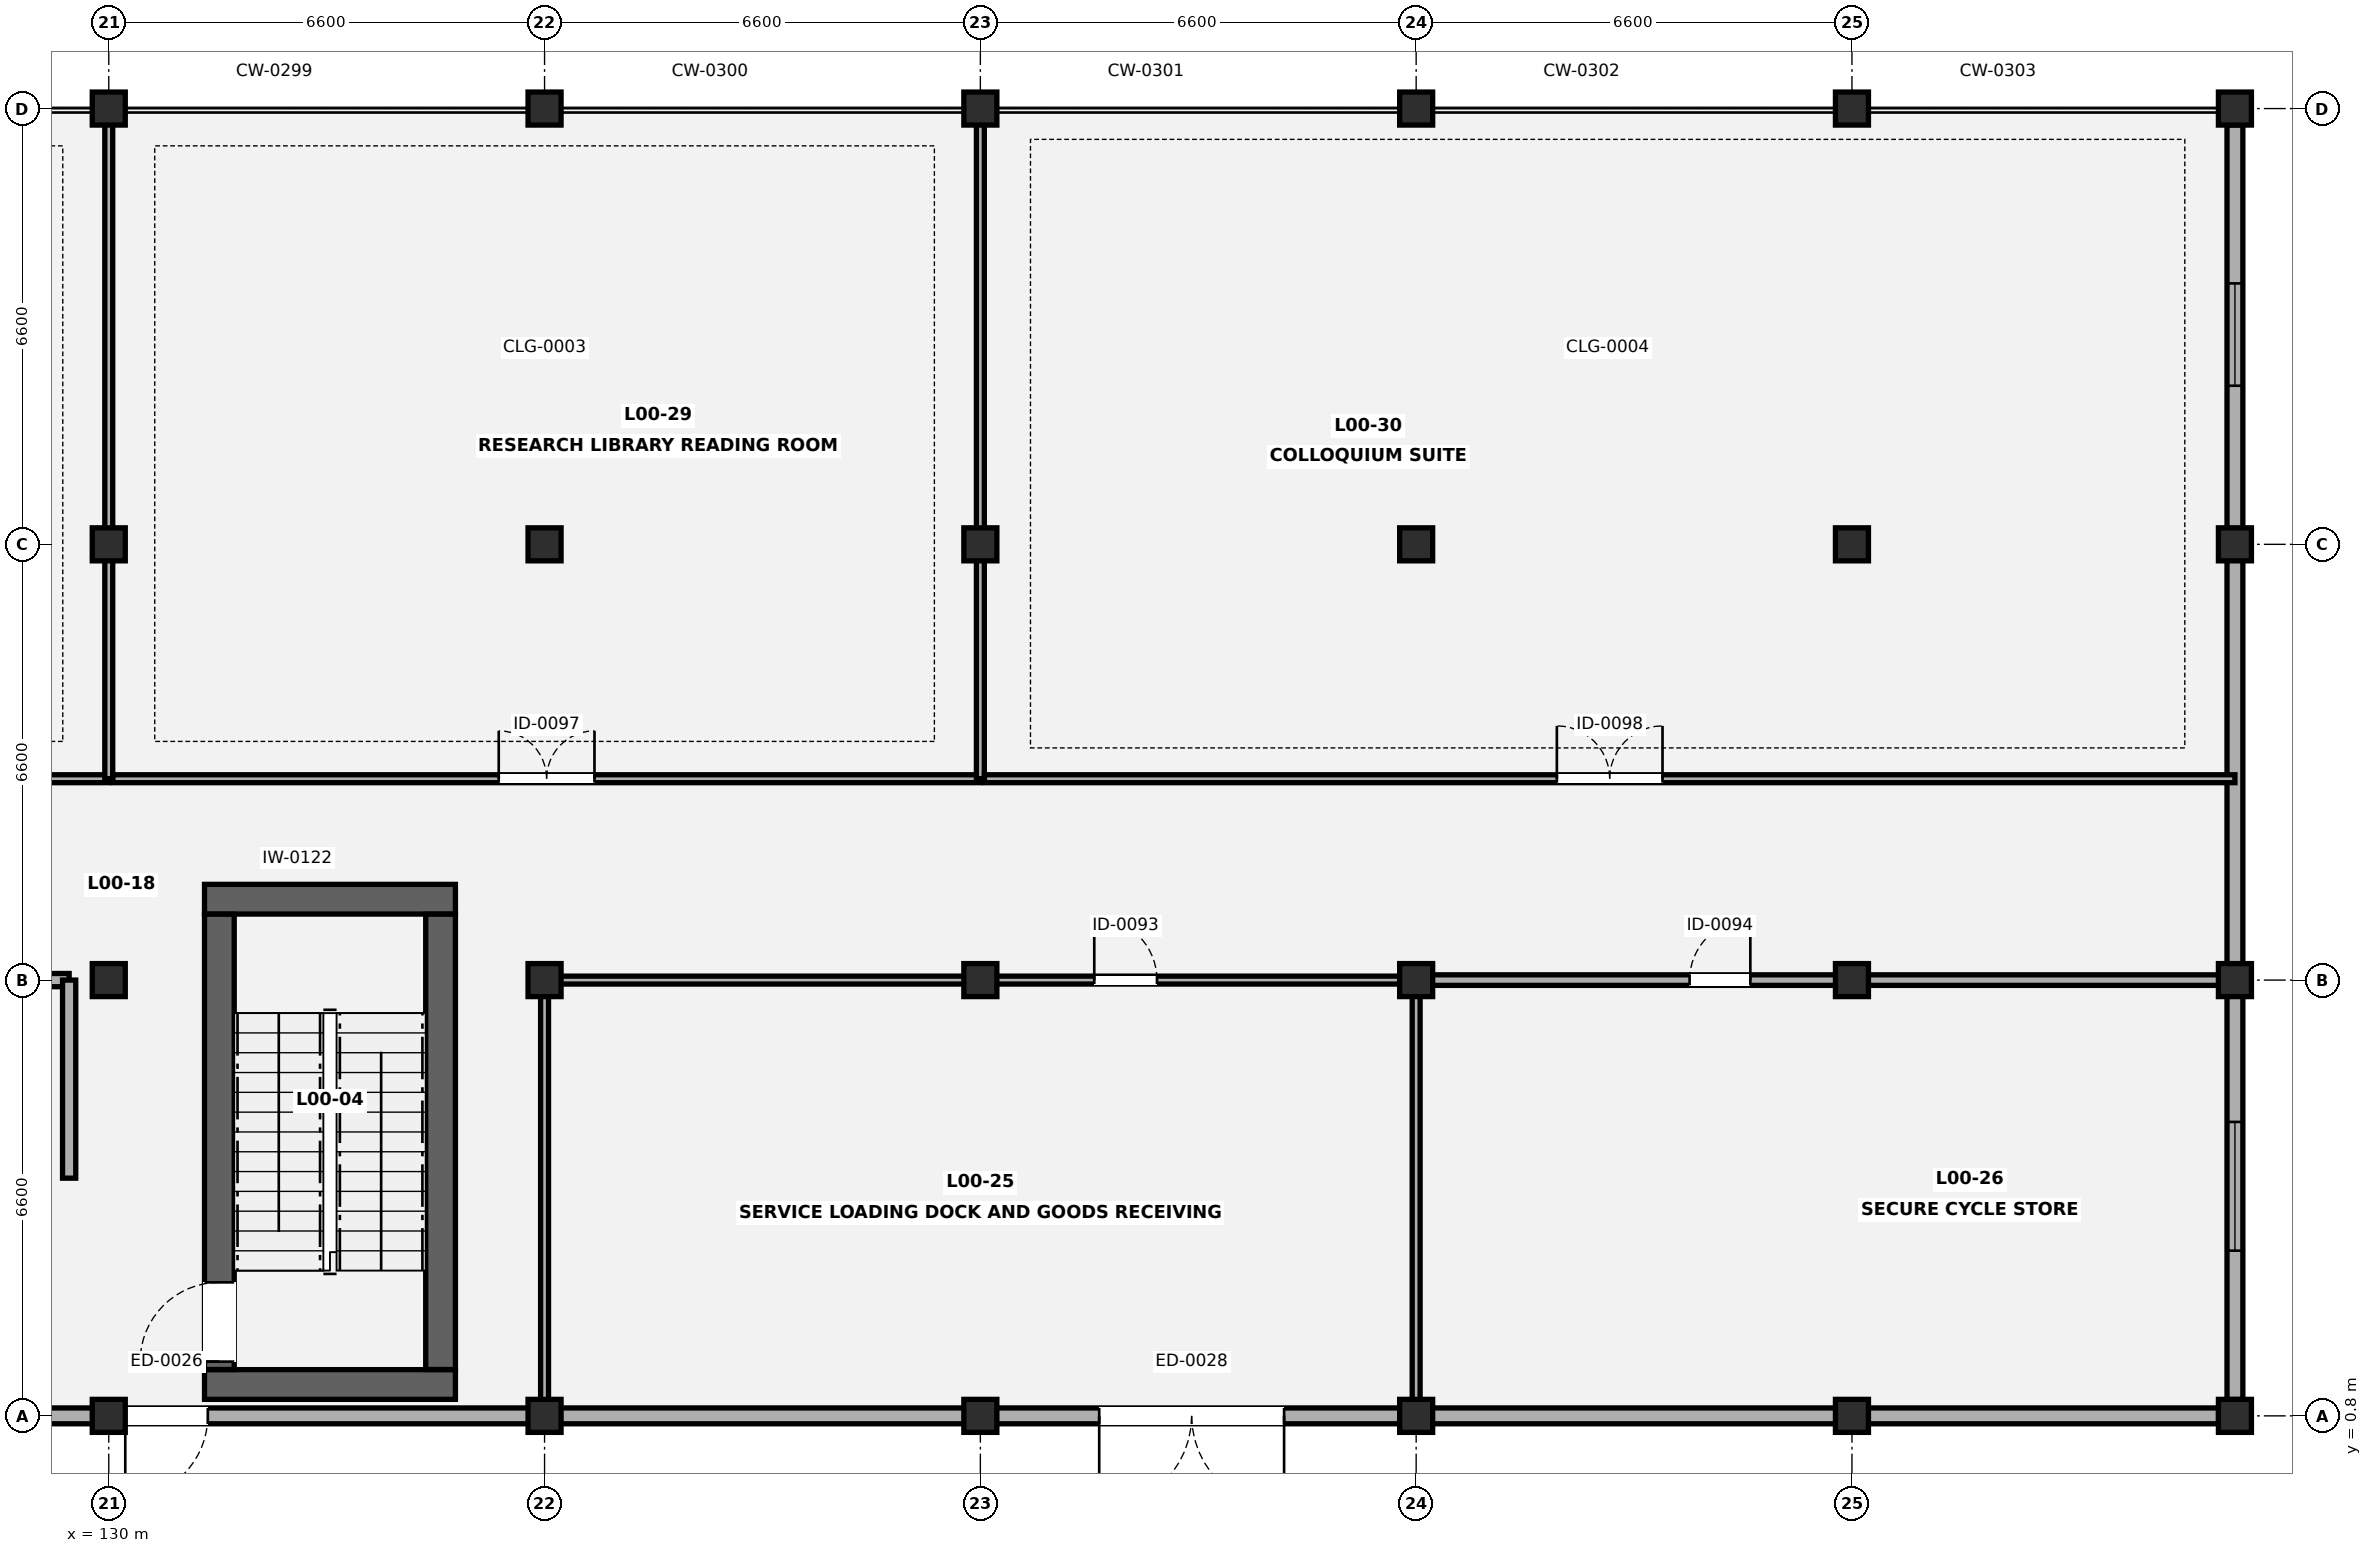
"""IFC4 building model, lengths in metres.
Left out: names, types, materials, properties, quantities, classifications, styles, units other than length and angle.
Written with IfcOpenShell. Run it as: python <this file> out.ifc"""

import sys

from ifc_helpers import new_model, si_unit, direction, frame, frame_2d, origin, origin_2d, place, context, subcontext, project, spatial, rectangle, i_section, extrude, element, fill, save


model = new_model("IFC4")
c1 = context("Model", 3, precision=1e-05, world=origin(), true_north=direction((0.0, 1.0)))
c2 = subcontext(c1, "Body", "Model", "MODEL_VIEW")
j1 = project(units=[si_unit("LENGTHUNIT", "METRE"), si_unit("PLANEANGLEUNIT", "RADIAN")], contexts=[c1])
p1 = place(None, origin())
s1 = spatial("IfcSite", under=j1, at=p1, CompositionType="ELEMENT")
p2 = place(p1, origin())
s2 = spatial("IfcBuilding", under=s1, at=p2, CompositionType="ELEMENT")
p3 = place(p2, origin())
s3 = spatial("IfcBuildingStorey", under=s2, at=p3, CompositionType="ELEMENT", Elevation=0.0)
for number, where, z_axis, x_axis in (
    (1, (130.0, 0.8, 0.0), (0.0, 0.0, 1.0), (1.0, 0.0, 0.0)),
    (2, (130.0, 7.4, 0.0), (0.0, 0.0, 1.0), (1.0, 0.0, 0.0)),
    (3, (130.0, 14.0, 0.0), (0.0, 0.0, 1.0), (1.0, 0.0, 0.0)),
    (4, (130.0, 20.6, 0.0), (0.0, 0.0, 1.0), (1.0, 0.0, 0.0)),
    (5, (136.6, 0.8, 0.0), (0.0, 0.0, 1.0), (1.0, 0.0, 0.0)),
    (6, (136.6, 7.4, 0.0), (0.0, 0.0, 1.0), (1.0, 0.0, 0.0)),
    (7, (136.6, 14.0, 0.0), (0.0, 0.0, 1.0), (1.0, 0.0, 0.0)),
    (8, (136.6, 20.6, 0.0), (0.0, 0.0, 1.0), (1.0, 0.0, 0.0)),
    (9, (143.2, 0.8, 0.0), (0.0, 0.0, 1.0), (1.0, 0.0, 0.0)),
    (10, (143.2, 7.4, 0.0), (0.0, 0.0, 1.0), (1.0, 0.0, 0.0)),
    (11, (143.2, 14.0, 0.0), (0.0, 0.0, 1.0), (1.0, 0.0, 0.0)),
    (12, (143.2, 20.6, 0.0), (0.0, 0.0, 1.0), (1.0, 0.0, 0.0)),
    (13, (149.8, 0.8, 0.0), (0.0, 0.0, 1.0), (1.0, 0.0, 0.0)),
    (14, (149.8, 7.4, 0.0), (0.0, 0.0, 1.0), (1.0, 0.0, 0.0)),
    (15, (149.8, 14.0, 0.0), (0.0, 0.0, 1.0), (1.0, 0.0, 0.0)),
    (16, (149.8, 20.6, 0.0), (0.0, 0.0, 1.0), (1.0, 0.0, 0.0)),
    (17, (156.4, 0.8, 0.0), (0.0, 0.0, 1.0), (1.0, 0.0, 0.0)),
    (18, (156.4, 7.4, 0.0), (0.0, 0.0, 1.0), (1.0, 0.0, 0.0)),
    (19, (156.4, 14.0, 0.0), (0.0, 0.0, 1.0), (1.0, 0.0, 0.0)),
    (20, (156.4, 20.6, 0.0), (0.0, 0.0, 1.0), (1.0, 0.0, 0.0)),
    (21, (162.2, 0.8, 0.0), (0.0, 0.0, 1.0), (1.0, 0.0, 0.0)),
    (22, (162.2, 7.4, 0.0), (0.0, 0.0, 1.0), (1.0, 0.0, 0.0)),
    (23, (162.2, 14.0, 0.0), (0.0, 0.0, 1.0), (1.0, 0.0, 0.0)),
    (24, (162.2, 20.6, 0.0), (0.0, 0.0, 1.0), (1.0, 0.0, 0.0)),
):
    element("IfcColumn", number, at=place(p3, frame(where, z_axis=z_axis, x_axis=x_axis)), inside=s3, PredefinedType="COLUMN", context=c2, shape_type="SweptSolid", body=[
        extrude(i_section(OverallWidth=0.5, OverallDepth=0.5, WebThickness=0.022, FlangeThickness=0.04, FilletRadius=0.016, at=origin_2d()), origin(), (0.0, 0.0, 1.0), 4.9),
    ])
p4 = place(p3, frame((162.2, 20.352, 0.0), z_axis=(0.0, 0.0, 1.0), x_axis=(0.0, -1.0, 0.0)))
e25 = element("IfcWall", 25, at=p4, inside=s3, PredefinedType="SOLIDWALL", context=c2, shape_type="SweptSolid", body=[
    extrude(rectangle(XDim=19.304, YDim=0.24, at=frame_2d((9.652, 0.0))), origin(), (0.0, 0.0, 1.0), 4.072),
])
p5 = place(p4, frame((2.4, 0.0, 0.85)))
e26 = element("IfcOpeningElement", 26, at=p5, cuts=e25, PredefinedType="OPENING", context=c2, shape_type="SweptSolid", body=[
    extrude(rectangle(XDim=1.55, YDim=1.4, at=frame_2d((0.775, 0.7))), frame((0.0, 0.13, 0.0), z_axis=(0.0, -1.0, 0.0), x_axis=(1.0, 0.0, 0.0)), (0.0, 0.0, 1.0), 0.26),
])
p6 = place(p4, frame((15.1, 0.0, 0.85)))
e27 = element("IfcOpeningElement", 27, at=p6, cuts=e25, PredefinedType="OPENING", context=c2, shape_type="SweptSolid", body=[
    extrude(rectangle(XDim=1.95, YDim=1.5, at=frame_2d((0.975, 0.75))), frame((0.0, 0.13, 0.0), z_axis=(0.0, -1.0, 0.0), x_axis=(1.0, 0.0, 0.0)), (0.0, 0.0, 1.0), 0.26),
])
p7 = place(p3, frame((161.952, 0.8, 0.0), z_axis=(0.0, 0.0, 1.0), x_axis=(-1.0, 0.0, 0.0)))
e28 = element("IfcWall", 28, at=p7, inside=s3, PredefinedType="SOLIDWALL", context=c2, shape_type="SweptSolid", body=[
    extrude(rectangle(XDim=58.104, YDim=0.24, at=frame_2d((29.052, 0.0))), origin(), (0.0, 0.0, 1.0), 4.205),
])
p8 = place(p7, frame((52.252, 0.0, 0.0)))
e29 = element("IfcOpeningElement", 29, at=p8, cuts=e28, PredefinedType="OPENING", context=c2, shape_type="SweptSolid", body=[
    extrude(rectangle(XDim=1.25, YDim=2.15, at=frame_2d((0.625, 1.075))), frame((0.0, 0.13, 0.0), z_axis=(0.0, -1.0, 0.0), x_axis=(1.0, 0.0, 0.0)), (0.0, 0.0, 1.0), 0.26),
])
p9 = place(p7, frame((30.452, 0.0, 0.0)))
e30 = element("IfcOpeningElement", 30, at=p9, cuts=e28, PredefinedType="OPENING", context=c2, shape_type="SweptSolid", body=[
    extrude(rectangle(XDim=1.25, YDim=2.15, at=frame_2d((0.625, 1.075))), frame((0.0, 0.13, 0.0), z_axis=(0.0, -1.0, 0.0), x_axis=(1.0, 0.0, 0.0)), (0.0, 0.0, 1.0), 0.26),
])
p10 = place(p7, frame((39.802, 0.0, 0.0)))
e31 = element("IfcOpeningElement", 31, at=p10, cuts=e28, PredefinedType="OPENING", context=c2, shape_type="SweptSolid", body=[
    extrude(rectangle(XDim=1.0, YDim=2.1, at=frame_2d((0.5, 1.05))), frame((0.0, 0.13, 0.0), z_axis=(0.0, -1.0, 0.0), x_axis=(1.0, 0.0, 0.0)), (0.0, 0.0, 1.0), 0.26),
])
p11 = place(p7, frame((14.152, 0.0, 0.0)))
e32 = element("IfcOpeningElement", 32, at=p11, cuts=e28, PredefinedType="OPENING", context=c2, shape_type="SweptSolid", body=[
    extrude(rectangle(XDim=2.8, YDim=2.25, at=frame_2d((1.4, 1.125))), frame((0.0, 0.13, 0.0), z_axis=(0.0, -1.0, 0.0), x_axis=(1.0, 0.0, 0.0)), (0.0, 0.0, 1.0), 0.26),
])
for number, where, z_axis, x_axis in (
    (33, (131.45, 1.275, 0.0), (0.0, 0.0, 1.0), (1.0, 0.0, 0.0)),
    (34, (131.45, 8.625, 0.0), (0.0, 0.0, 1.0), (1.0, 0.0, 0.0)),
):
    element("IfcWall", number, at=place(p3, frame(where, z_axis=z_axis, x_axis=x_axis)), inside=s3, PredefinedType="SHEAR", context=c2, shape_type="SweptSolid", body=[
        extrude(rectangle(XDim=3.8, YDim=0.45, at=frame_2d((1.9, 0.0))), origin(), (0.0, 0.0, 1.0), 4.72),
    ])
p12 = place(p3, frame((131.675, 1.502, 0.0), z_axis=(0.0, 0.0, 1.0), x_axis=(0.0, 1.0, 0.0)))
e35 = element("IfcWall", 35, at=p12, inside=s3, PredefinedType="SHEAR", context=c2, shape_type="SweptSolid", body=[
    extrude(rectangle(XDim=6.896, YDim=0.45, at=frame_2d((3.448, 0.0))), origin(), (0.0, 0.0, 1.0), 4.72),
])
p13 = place(p12, frame((0.12, 0.0, 0.0)))
e36 = element("IfcOpeningElement", 36, at=p13, cuts=e35, PredefinedType="OPENING", context=c2, shape_type="SweptSolid", body=[
    extrude(rectangle(XDim=1.2, YDim=2.15, at=frame_2d((0.6, 1.075))), frame((0.0, 0.235, 0.0), z_axis=(0.0, -1.0, 0.0), x_axis=(1.0, 0.0, 0.0)), (0.0, 0.0, 1.0), 0.47),
])
p14 = place(p3, frame((135.025, 1.502, 0.0), z_axis=(0.0, 0.0, 1.0), x_axis=(0.0, 1.0, 0.0)))
e37 = element("IfcWall", 37, at=p14, inside=s3, PredefinedType="SHEAR", context=c2, shape_type="SweptSolid", body=[
    extrude(rectangle(XDim=6.896, YDim=0.45, at=frame_2d((3.448, 0.0))), origin(), (0.0, 0.0, 1.0), 4.72),
])
p15 = place(p3, frame((125.8, 7.4, 0.0), z_axis=(0.0, 0.0, 1.0), x_axis=(1.0, 0.0, 0.0)))
e38 = element("IfcWall", 38, at=p15, inside=s3, PredefinedType="SOLIDWALL", context=c2, shape_type="SweptSolid", body=[
    extrude(rectangle(XDim=3.6, YDim=0.2, at=frame_2d((1.8, 0.0))), origin(), (0.0, 0.0, 1.0), 3.993),
])
p16 = place(p15, frame((1.225, 0.0, 0.0)))
e39 = element("IfcOpeningElement", 39, at=p16, cuts=e38, PredefinedType="OPENING", context=c2, shape_type="SweptSolid", body=[
    extrude(rectangle(XDim=1.15, YDim=2.15, at=frame_2d((0.575, 1.075))), frame((0.0, 0.11, 0.0), z_axis=(0.0, -1.0, 0.0), x_axis=(1.0, 0.0, 0.0)), (0.0, 0.0, 1.0), 0.22),
])
p17 = place(p3, frame((129.4, 4.4, 0.0), z_axis=(0.0, 0.0, 1.0), x_axis=(0.0, 1.0, 0.0)))
e40 = element("IfcWall", 40, at=p17, inside=s3, PredefinedType="SOLIDWALL", context=c2, shape_type="SweptSolid", body=[
    extrude(rectangle(XDim=3.0, YDim=0.2, at=frame_2d((1.5, 0.0))), origin(), (0.0, 0.0, 1.0), 4.72),
])
p18 = place(p3, frame((136.6, 7.4, 0.0), z_axis=(0.0, 0.0, 1.0), x_axis=(1.0, 0.0, 0.0)))
e41 = element("IfcWall", 41, at=p18, inside=s3, PredefinedType="PARTITIONING", context=c2, shape_type="SweptSolid", body=[
    extrude(rectangle(XDim=13.2, YDim=0.12, at=frame_2d((6.6, 0.0))), origin(), (0.0, 0.0, 1.0), 3.993),
])
p19 = place(p18, frame((8.325, 0.0, 0.0)))
e42 = element("IfcOpeningElement", 42, at=p19, cuts=e41, PredefinedType="OPENING", context=c2, shape_type="SweptSolid", body=[
    extrude(rectangle(XDim=0.95, YDim=2.1, at=frame_2d((0.475, 1.05))), frame((0.0, 0.07, 0.0), z_axis=(0.0, -1.0, 0.0), x_axis=(1.0, 0.0, 0.0)), (0.0, 0.0, 1.0), 0.14),
])
p20 = place(p3, frame((136.6, 0.942, 0.0), z_axis=(0.0, 0.0, 1.0), x_axis=(0.0, 1.0, 0.0)))
e43 = element("IfcWall", 43, at=p20, inside=s3, PredefinedType="PARTITIONING", context=c2, shape_type="SweptSolid", body=[
    extrude(rectangle(XDim=6.396, YDim=0.12, at=frame_2d((3.198, 0.0))), origin(), (0.0, 0.0, 1.0), 4.072),
])
p21 = place(p3, frame((149.8, 0.942, 0.0), z_axis=(0.0, 0.0, 1.0), x_axis=(0.0, 1.0, 0.0)))
e44 = element("IfcWall", 44, at=p21, inside=s3, PredefinedType="PARTITIONING", context=c2, shape_type="SweptSolid", body=[
    extrude(rectangle(XDim=6.458, YDim=0.12, at=frame_2d((3.229, 0.0))), origin(), (0.0, 0.0, 1.0), 4.072),
])
p22 = place(p3, frame((149.802, 7.4, 0.0), z_axis=(0.0, 0.0, 1.0), x_axis=(1.0, 0.0, 0.0)))
e45 = element("IfcWall", 45, at=p22, inside=s3, PredefinedType="PARTITIONING", context=c2, shape_type="SweptSolid", body=[
    extrude(rectangle(XDim=12.398, YDim=0.16, at=frame_2d((6.199, 0.0))), origin(), (0.0, 0.0, 1.0), 3.993),
])
p23 = place(p22, frame((4.139, 0.0, 0.0)))
e46 = element("IfcOpeningElement", 46, at=p23, cuts=e45, PredefinedType="OPENING", context=c2, shape_type="SweptSolid", body=[
    extrude(rectangle(XDim=0.92, YDim=2.12, at=frame_2d((0.46, 1.06))), frame((0.0, 0.09, 0.0), z_axis=(0.0, -1.0, 0.0), x_axis=(1.0, 0.0, 0.0)), (0.0, 0.0, 1.0), 0.18),
])
p24 = place(p3, frame((116.862, 10.45, 0.0), z_axis=(0.0, 0.0, 1.0), x_axis=(1.0, 0.0, 0.0)))
e47 = element("IfcWall", 47, at=p24, inside=s3, PredefinedType="PARTITIONING", context=c2, shape_type="SweptSolid", body=[
    extrude(rectangle(XDim=13.138, YDim=0.12, at=frame_2d((6.569, 0.0))), origin(), (0.0, 0.0, 1.0), 4.246),
])
p25 = place(p24, frame((6.029, 0.0, 0.0)))
e48 = element("IfcOpeningElement", 48, at=p25, cuts=e47, PredefinedType="OPENING", context=c2, shape_type="SweptSolid", body=[
    extrude(rectangle(XDim=1.08, YDim=2.12, at=frame_2d((0.54, 1.06))), frame((0.0, 0.07, 0.0), z_axis=(0.0, -1.0, 0.0), x_axis=(1.0, 0.0, 0.0)), (0.0, 0.0, 1.0), 0.14),
])
p26 = place(p3, frame((130.0, 10.45, 0.0), z_axis=(0.0, 0.0, 1.0), x_axis=(0.0, 1.0, 0.0)))
e49 = element("IfcWall", 49, at=p26, inside=s3, PredefinedType="PARTITIONING", context=c2, shape_type="SweptSolid", body=[
    extrude(rectangle(XDim=10.15, YDim=0.12, at=frame_2d((5.075, 0.0))), origin(), (0.0, 0.0, 1.0), 4.072),
])
p27 = place(p3, frame((130.062, 10.45, 0.0), z_axis=(0.0, 0.0, 1.0), x_axis=(1.0, 0.0, 0.0)))
e50 = element("IfcWall", 50, at=p27, inside=s3, PredefinedType="PARTITIONING", context=c2, shape_type="SweptSolid", body=[
    extrude(rectangle(XDim=13.138, YDim=0.12, at=frame_2d((6.569, 0.0))), origin(), (0.0, 0.0, 1.0), 4.246),
])
p28 = place(p27, frame((5.844, 0.0, 0.0)))
e51 = element("IfcOpeningElement", 51, at=p28, cuts=e50, PredefinedType="OPENING", context=c2, shape_type="SweptSolid", body=[
    extrude(rectangle(XDim=1.45, YDim=2.12, at=frame_2d((0.725, 1.06))), frame((0.0, 0.07, 0.0), z_axis=(0.0, -1.0, 0.0), x_axis=(1.0, 0.0, 0.0)), (0.0, 0.0, 1.0), 0.14),
])
p29 = place(p3, frame((143.2, 10.45, 0.0), z_axis=(0.0, 0.0, 1.0), x_axis=(0.0, 1.0, 0.0)))
e52 = element("IfcWall", 52, at=p29, inside=s3, PredefinedType="PARTITIONING", context=c2, shape_type="SweptSolid", body=[
    extrude(rectangle(XDim=10.15, YDim=0.12, at=frame_2d((5.075, 0.0))), origin(), (0.0, 0.0, 1.0), 4.072),
])
p30 = place(p3, frame((143.262, 10.45, 0.0), z_axis=(0.0, 0.0, 1.0), x_axis=(1.0, 0.0, 0.0)))
e53 = element("IfcWall", 53, at=p30, inside=s3, PredefinedType="PARTITIONING", context=c2, shape_type="SweptSolid", body=[
    extrude(rectangle(XDim=18.938, YDim=0.12, at=frame_2d((9.469, 0.0))), origin(), (0.0, 0.0, 1.0), 4.246),
])
p31 = place(p30, frame((8.669, 0.0, 0.0)))
e54 = element("IfcOpeningElement", 54, at=p31, cuts=e53, PredefinedType="OPENING", context=c2, shape_type="SweptSolid", body=[
    extrude(rectangle(XDim=1.6, YDim=2.18, at=frame_2d((0.8, 1.09))), frame((0.0, 0.07, 0.0), z_axis=(0.0, -1.0, 0.0), x_axis=(1.0, 0.0, 0.0)), (0.0, 0.0, 1.0), 0.14),
])
p32 = place(p5, origin())
e55 = element("IfcWindow", 55, at=p32, inside=s3, PartitioningType="SINGLE_PANEL", PredefinedType="WINDOW", context=c2, shape_type="SweptSolid", body=[
    extrude(rectangle(XDim=1.55, YDim=1.4, at=frame_2d((0.775, 0.7))), frame((0.0, 0.03, 0.0), z_axis=(0.0, -1.0, 0.0), x_axis=(1.0, 0.0, 0.0)), (0.0, 0.0, 1.0), 0.06),
])
fill(e26, e55)
p33 = place(p6, origin())
e56 = element("IfcWindow", 56, at=p33, inside=s3, PartitioningType="SINGLE_PANEL", PredefinedType="WINDOW", context=c2, shape_type="SweptSolid", body=[
    extrude(rectangle(XDim=1.95, YDim=1.5, at=frame_2d((0.975, 0.75))), frame((0.0, 0.03, 0.0), z_axis=(0.0, -1.0, 0.0), x_axis=(1.0, 0.0, 0.0)), (0.0, 0.0, 1.0), 0.06),
])
fill(e27, e56)
p34 = place(p9, origin())
e57 = element("IfcDoor", 57, at=p34, inside=s3, OperationType="SINGLE_SWING_RIGHT", PredefinedType="DOOR", context=c2, shape_type="SweptSolid", body=[
    extrude(rectangle(XDim=1.25, YDim=2.15, at=frame_2d((0.625, 1.075))), frame((0.0, 0.025, 0.0), z_axis=(0.0, -1.0, 0.0), x_axis=(1.0, 0.0, 0.0)), (0.0, 0.0, 1.0), 0.05),
])
fill(e30, e57)
p35 = place(p11, origin())
e58 = element("IfcDoor", 58, at=p35, inside=s3, OperationType="DOUBLE_DOOR_SINGLE_SWING", PredefinedType="GATE", context=c2, shape_type="SweptSolid", body=[
    extrude(rectangle(XDim=2.8, YDim=2.25, at=frame_2d((1.4, 1.125))), frame((0.0, 0.025, 0.0), z_axis=(0.0, -1.0, 0.0), x_axis=(1.0, 0.0, 0.0)), (0.0, 0.0, 1.0), 0.05),
])
fill(e32, e58)
p36 = place(p13, origin())
e59 = element("IfcDoor", 59, at=p36, inside=s3, OperationType="SINGLE_SWING_LEFT", PredefinedType="DOOR", context=c2, shape_type="SweptSolid", body=[
    extrude(rectangle(XDim=1.2, YDim=2.15, at=frame_2d((0.6, 1.075))), frame((0.0, 0.025, 0.0), z_axis=(0.0, -1.0, 0.0), x_axis=(1.0, 0.0, 0.0)), (0.0, 0.0, 1.0), 0.05),
])
fill(e36, e59)
p37 = place(p19, origin())
e60 = element("IfcDoor", 60, at=p37, inside=s3, OperationType="SINGLE_SWING_LEFT", PredefinedType="DOOR", context=c2, shape_type="SweptSolid", body=[
    extrude(rectangle(XDim=0.95, YDim=2.1, at=frame_2d((0.475, 1.05))), frame((0.0, 0.025, 0.0), z_axis=(0.0, -1.0, 0.0), x_axis=(1.0, 0.0, 0.0)), (0.0, 0.0, 1.0), 0.05),
])
fill(e42, e60)
p38 = place(p23, origin())
e61 = element("IfcDoor", 61, at=p38, inside=s3, OperationType="SINGLE_SWING_RIGHT", PredefinedType="DOOR", context=c2, shape_type="SweptSolid", body=[
    extrude(rectangle(XDim=0.92, YDim=2.12, at=frame_2d((0.46, 1.06))), frame((0.0, 0.025, 0.0), z_axis=(0.0, -1.0, 0.0), x_axis=(1.0, 0.0, 0.0)), (0.0, 0.0, 1.0), 0.05),
])
fill(e46, e61)
p39 = place(p28, origin())
e62 = element("IfcDoor", 62, at=p39, inside=s3, OperationType="DOUBLE_DOOR_SINGLE_SWING", PredefinedType="DOOR", context=c2, shape_type="SweptSolid", body=[
    extrude(rectangle(XDim=1.45, YDim=2.12, at=frame_2d((0.725, 1.06))), frame((0.0, 0.025, 0.0), z_axis=(0.0, -1.0, 0.0), x_axis=(1.0, 0.0, 0.0)), (0.0, 0.0, 1.0), 0.05),
])
fill(e51, e62)
p40 = place(p31, origin())
e63 = element("IfcDoor", 63, at=p40, inside=s3, OperationType="DOUBLE_DOOR_SINGLE_SWING", PredefinedType="DOOR", context=c2, shape_type="SweptSolid", body=[
    extrude(rectangle(XDim=1.6, YDim=2.18, at=frame_2d((0.8, 1.09))), frame((0.0, 0.025, 0.0), z_axis=(0.0, -1.0, 0.0), x_axis=(1.0, 0.0, 0.0)), (0.0, 0.0, 1.0), 0.05),
])
fill(e54, e63)
save(model, sys.argv[1])
